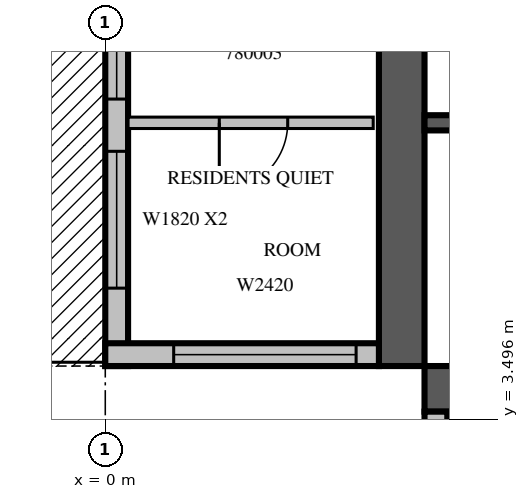
"""IFC4 building model, lengths in metres.
Left out: names, types, materials, properties, quantities, classifications, styles, units other than length and angle.
Written with IfcOpenShell. Run it as: python <this file> out.ifc"""

import sys

from ifc_helpers import new_model, si_unit, direction, frame, frame_2d, origin, place, context, subcontext, project, spatial, rectangle, extrude, source, transform, mapped, element, fill, save


model = new_model("IFC4")
c1 = context("Model", 3, precision=1e-05, world=origin(), true_north=direction((0.0, 1.0)))
c2 = subcontext(c1, "Body", "Model", "MODEL_VIEW")
j1 = project(units=[si_unit("LENGTHUNIT", "METRE"), si_unit("PLANEANGLEUNIT", "RADIAN")], contexts=[c1])
p1 = place(None, origin())
s1 = spatial("IfcSite", under=j1, at=p1, CompositionType="ELEMENT")
p2 = place(p1, origin())
s2 = spatial("IfcBuilding", under=s1, at=p2, CompositionType="ELEMENT")
p3 = place(p2, frame((0.0, 0.0, 340.5)))
s3 = spatial("IfcBuildingStorey", under=s2, at=p3, CompositionType="ELEMENT", Elevation=340.5)
m1 = source(origin(), c2, "Body", "SweptSolid", [
    extrude(rectangle(XDim=17.4, YDim=0.6, at=frame_2d((8.7, 0.0))), origin(), (0.0, 0.0, 1.0), 3.5),
])
p4 = place(p3, frame((3.9, 4.2, 0.0), z_axis=(0.0, 0.0, 1.0), x_axis=(0.0, 1.0, 0.0)))
e1 = element("IfcWall", 1, at=p4, inside=s3, PredefinedType="SHEAR", context=c2, shape_type="MappedRepresentation", body=[
    mapped(m1, transform((0.0, 0.0, 0.0), scale=1.0)),
])
m2 = source(origin(), c2, "Body", "SweptSolid", [
    extrude(rectangle(XDim=2.2, YDim=2.1, at=frame_2d((1.1, 1.05))), frame((0.0, 0.31, 0.0), z_axis=(0.0, -1.0, 0.0), x_axis=(1.0, 0.0, 0.0)), (0.0, 0.0, 1.0), 0.62),
])
p5 = place(p4, frame((4.2, 0.0, 0.0)))
e2 = element("IfcOpeningElement", 2, at=p5, cuts=e1, PredefinedType="OPENING", context=c2, shape_type="MappedRepresentation", body=[
    mapped(m2, transform((0.0, 0.0, 0.0), scale=1.0)),
])
p6 = place(p3, frame((4.2, 3.9, 0.0), z_axis=(0.0, 0.0, 1.0), x_axis=(1.0, 0.0, 0.0)))
e3 = element("IfcWall", 3, at=p6, inside=s3, PredefinedType="SHEAR", context=c2, shape_type="MappedRepresentation", body=[
    mapped(m1, transform((0.0, 0.0, 0.0), scale=1.0)),
])
m3 = source(origin(), c2, "Body", "SweptSolid", [
    extrude(rectangle(XDim=0.9, YDim=2.1, at=frame_2d((0.45, 1.05))), frame((0.0, 0.31, 0.0), z_axis=(0.0, -1.0, 0.0), x_axis=(1.0, 0.0, 0.0)), (0.0, 0.0, 1.0), 0.62),
])
p7 = place(p6, frame((15.2, 0.0, 0.0)))
e4 = element("IfcOpeningElement", 4, at=p7, cuts=e3, PredefinedType="OPENING", context=c2, shape_type="MappedRepresentation", body=[
    mapped(m3, transform((0.0, 0.0, 0.0), scale=1.0)),
])
m4 = source(origin(), c2, "Body", "SweptSolid", [
    extrude(rectangle(XDim=6.0, YDim=0.3, at=frame_2d((3.0, 0.0))), origin(), (0.0, 0.0, 1.0), 3.1),
])
p8 = place(p3, frame((0.15, 10.2, 0.0), z_axis=(0.0, 0.0, 1.0), x_axis=(0.0, -1.0, 0.0)))
e5 = element("IfcWall", 5, at=p8, inside=s3, PredefinedType="STANDARD", context=c2, shape_type="MappedRepresentation", body=[
    mapped(m4, transform((0.0, 0.0, 0.0), scale=1.0)),
])
m5 = source(origin(), c2, "Body", "SweptSolid", [
    extrude(rectangle(XDim=1.8, YDim=2.0, at=frame_2d((0.9, 1.0))), frame((0.0, 0.16, 0.0), z_axis=(0.0, -1.0, 0.0), x_axis=(1.0, 0.0, 0.0)), (0.0, 0.0, 1.0), 0.32),
])
p9 = place(p8, frame((3.175, 0.0, 0.6)))
e6 = element("IfcOpeningElement", 6, at=p9, cuts=e5, PredefinedType="OPENING", context=c2, shape_type="MappedRepresentation", body=[
    mapped(m5, transform((0.0, 0.0, 0.0), scale=1.0)),
])
p10 = place(p8, frame((0.688, 0.0, 0.6)))
e7 = element("IfcOpeningElement", 7, at=p10, cuts=e5, PredefinedType="OPENING", context=c2, shape_type="MappedRepresentation", body=[
    mapped(m5, transform((0.0, 0.0, 0.0), scale=1.0)),
])
m6 = source(origin(), c2, "Body", "SweptSolid", [
    extrude(rectangle(XDim=3.6, YDim=0.3, at=frame_2d((1.8, 0.0))), origin(), (0.0, 0.0, 1.0), 3.1),
])
p11 = place(p3, frame((0.0, 4.35, 0.0), z_axis=(0.0, 0.0, 1.0), x_axis=(1.0, 0.0, 0.0)))
e8 = element("IfcWall", 8, at=p11, inside=s3, PredefinedType="STANDARD", context=c2, shape_type="MappedRepresentation", body=[
    mapped(m6, transform((0.0, 0.0, 0.0), scale=1.0)),
])
m7 = source(origin(), c2, "Body", "SweptSolid", [
    extrude(rectangle(XDim=2.4, YDim=2.0, at=frame_2d((1.2, 1.0))), frame((0.0, 0.16, 0.0), z_axis=(0.0, -1.0, 0.0), x_axis=(1.0, 0.0, 0.0)), (0.0, 0.0, 1.0), 0.32),
])
p12 = place(p11, frame((0.9, 0.0, 0.6)))
e9 = element("IfcOpeningElement", 9, at=p12, cuts=e8, PredefinedType="OPENING", context=c2, shape_type="MappedRepresentation", body=[
    mapped(m7, transform((0.0, 0.0, 0.0), scale=1.0)),
])
p13 = place(p3, frame((4.35, 3.6, 0.0), z_axis=(0.0, 0.0, 1.0), x_axis=(0.0, -1.0, 0.0)))
e10 = element("IfcWall", 10, at=p13, inside=s3, PredefinedType="STANDARD", context=c2, shape_type="MappedRepresentation", body=[
    mapped(m6, transform((0.0, 0.0, 0.0), scale=1.0)),
])
p14 = place(p13, frame((0.3, 0.0, 0.6)))
e11 = element("IfcOpeningElement", 11, at=p14, cuts=e10, PredefinedType="OPENING", context=c2, shape_type="MappedRepresentation", body=[
    mapped(m7, transform((0.0, 0.0, 0.0), scale=1.0)),
])
m8 = source(origin(), c2, "Body", "SweptSolid", [
    extrude(rectangle(XDim=9.6, YDim=0.2, at=frame_2d((4.8, 0.0))), origin(), (0.0, 0.0, 1.0), 3.5),
])
p15 = place(p3, frame((4.2, 7.4, 0.0), z_axis=(0.0, 0.0, 1.0), x_axis=(1.0, 0.0, 0.0)))
e12 = element("IfcWall", 12, at=p15, inside=s3, PredefinedType="SOLIDWALL", context=c2, shape_type="MappedRepresentation", body=[
    mapped(m8, transform((0.0, 0.0, 0.0), scale=1.0)),
])
m9 = source(origin(), c2, "Body", "SweptSolid", [
    extrude(rectangle(XDim=1.1, YDim=2.1, at=frame_2d((0.55, 1.05))), frame((0.0, 0.11, 0.0), z_axis=(0.0, -1.0, 0.0), x_axis=(1.0, 0.0, 0.0)), (0.0, 0.0, 1.0), 0.22),
])
p16 = place(p15, frame((0.65, 0.0, 0.0)))
e13 = element("IfcOpeningElement", 13, at=p16, cuts=e12, PredefinedType="OPENING", context=c2, shape_type="MappedRepresentation", body=[
    mapped(m9, transform((0.0, 0.0, 0.0), scale=1.0)),
])
p17 = place(p15, frame((3.05, 0.0, 0.0)))
e14 = element("IfcOpeningElement", 14, at=p17, cuts=e12, PredefinedType="OPENING", context=c2, shape_type="MappedRepresentation", body=[
    mapped(m9, transform((0.0, 0.0, 0.0), scale=1.0)),
])
p18 = place(p15, frame((5.45, 0.0, 0.0)))
e15 = element("IfcOpeningElement", 15, at=p18, cuts=e12, PredefinedType="OPENING", context=c2, shape_type="MappedRepresentation", body=[
    mapped(m9, transform((0.0, 0.0, 0.0), scale=1.0)),
])
p19 = place(p15, frame((7.85, 0.0, 0.0)))
e16 = element("IfcOpeningElement", 16, at=p19, cuts=e12, PredefinedType="OPENING", context=c2, shape_type="MappedRepresentation", body=[
    mapped(m9, transform((0.0, 0.0, 0.0), scale=1.0)),
])
m10 = source(origin(), c2, "Body", "SweptSolid", [
    extrude(rectangle(XDim=3.225, YDim=0.15, at=frame_2d((1.613, 0.0))), origin(), (0.0, 0.0, 1.0), 3.1),
])
p20 = place(p3, frame((0.3, 7.4, 0.0), z_axis=(0.0, 0.0, 1.0), x_axis=(1.0, 0.0, 0.0)))
e17 = element("IfcWall", 17, at=p20, inside=s3, PredefinedType="PARTITIONING", context=c2, shape_type="MappedRepresentation", body=[
    mapped(m10, transform((0.0, 0.0, 0.0), scale=1.0)),
])
m11 = source(origin(), c2, "Body", "SweptSolid", [
    extrude(rectangle(XDim=0.9, YDim=2.1, at=frame_2d((0.45, 1.05))), frame((0.0, 0.085, 0.0), z_axis=(0.0, -1.0, 0.0), x_axis=(1.0, 0.0, 0.0)), (0.0, 0.0, 1.0), 0.17),
])
p21 = place(p20, frame((1.2, 0.0, 0.0)))
e18 = element("IfcOpeningElement", 18, at=p21, cuts=e17, PredefinedType="OPENING", context=c2, shape_type="MappedRepresentation", body=[
    mapped(m11, transform((0.0, 0.0, 0.0), scale=1.0)),
])
m12 = source(origin(), c2, "Body", "SweptSolid", [
    extrude(rectangle(XDim=1.8, YDim=2.0, at=frame_2d((0.9, 1.0))), frame((0.0, 0.03, 0.0), z_axis=(0.0, -1.0, 0.0), x_axis=(1.0, 0.0, 0.0)), (0.0, 0.0, 1.0), 0.06),
])
p22 = place(p9, origin())
e19 = element("IfcWindow", 19, at=p22, inside=s3, PartitioningType="SINGLE_PANEL", PredefinedType="WINDOW", context=c2, shape_type="MappedRepresentation", body=[
    mapped(m12, transform((0.0, 0.0, 0.0), scale=1.0)),
])
fill(e6, e19)
p23 = place(p10, origin())
e20 = element("IfcWindow", 20, at=p23, inside=s3, PartitioningType="SINGLE_PANEL", PredefinedType="WINDOW", context=c2, shape_type="MappedRepresentation", body=[
    mapped(m12, transform((0.0, 0.0, 0.0), scale=1.0)),
])
fill(e7, e20)
m13 = source(origin(), c2, "Body", "SweptSolid", [
    extrude(rectangle(XDim=2.4, YDim=2.0, at=frame_2d((1.2, 1.0))), frame((0.0, 0.03, 0.0), z_axis=(0.0, -1.0, 0.0), x_axis=(1.0, 0.0, 0.0)), (0.0, 0.0, 1.0), 0.06),
])
p24 = place(p12, origin())
e21 = element("IfcWindow", 21, at=p24, inside=s3, PartitioningType="SINGLE_PANEL", PredefinedType="WINDOW", context=c2, shape_type="MappedRepresentation", body=[
    mapped(m13, transform((0.0, 0.0, 0.0), scale=1.0)),
])
fill(e9, e21)
m14 = source(origin(), c2, "Body", "SweptSolid", [
    extrude(rectangle(XDim=0.9, YDim=2.1, at=frame_2d((0.45, 1.05))), frame((0.0, 0.025, 0.0), z_axis=(0.0, -1.0, 0.0), x_axis=(1.0, 0.0, 0.0)), (0.0, 0.0, 1.0), 0.05),
])
p25 = place(p21, origin())
e22 = element("IfcDoor", 22, at=p25, inside=s3, OperationType="SINGLE_SWING_RIGHT", PredefinedType="DOOR", context=c2, shape_type="MappedRepresentation", body=[
    mapped(m14, transform((0.0, 0.0, 0.0), scale=1.0)),
])
fill(e18, e22)
save(model, sys.argv[1])
